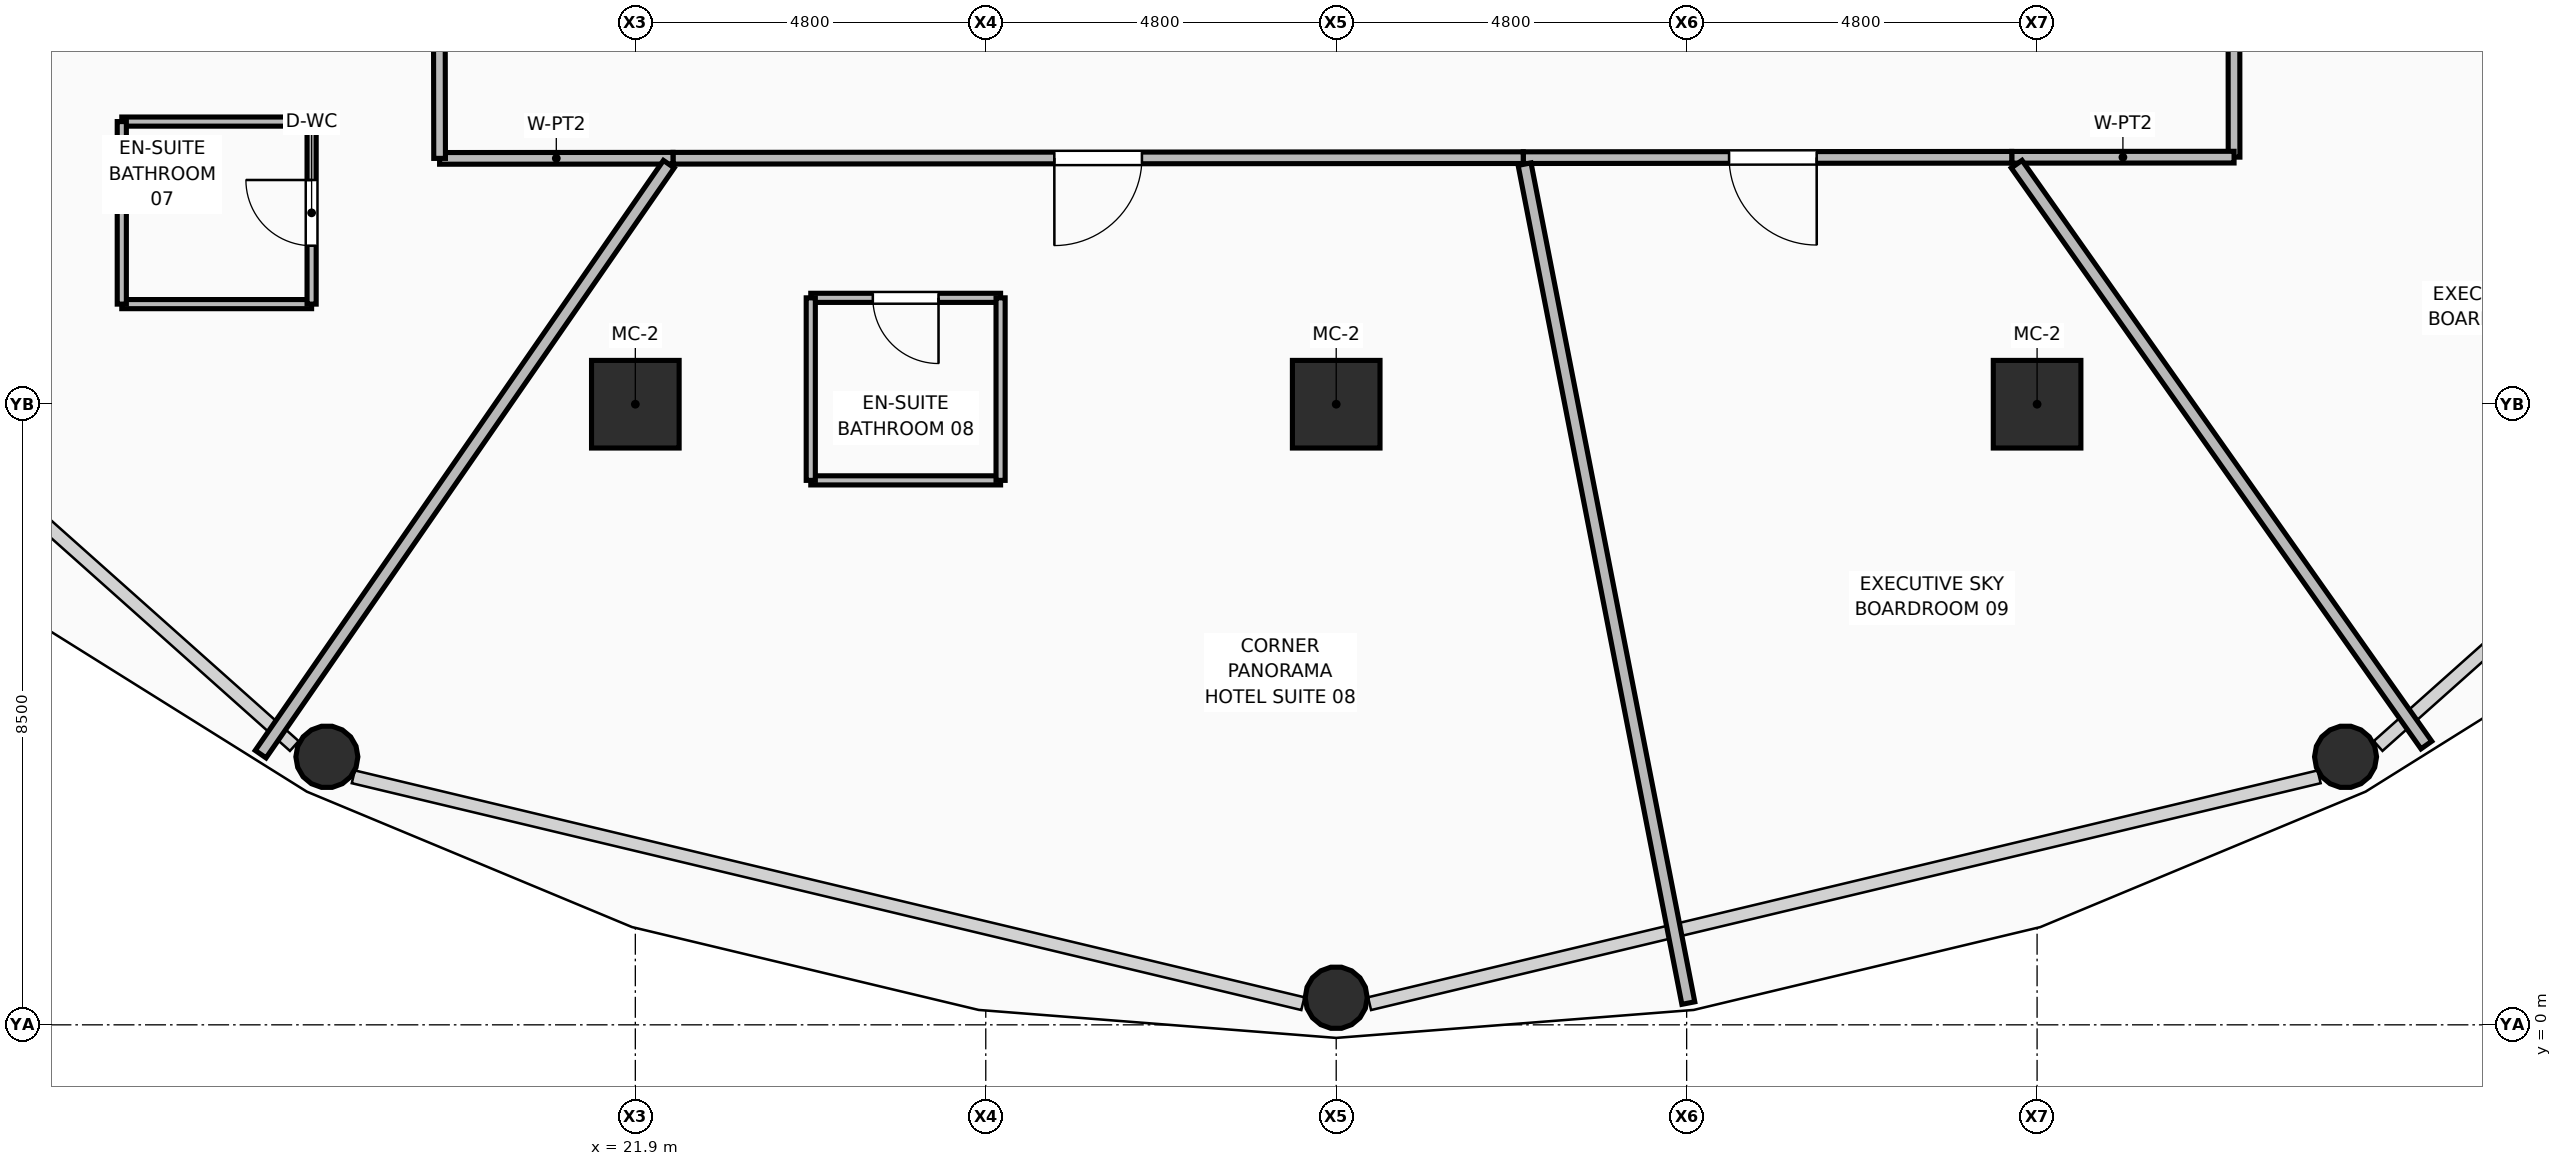
"""IFC4 building model, lengths in metres.
Left out: names, types, materials, properties, quantities, classifications, styles, units other than length and angle.
Written with IfcOpenShell. Run it as: python <this file> out.ifc"""

import sys

from ifc_helpers import new_model, si_unit, direction, frame, frame_2d, origin, origin_2d, place, context, subcontext, project, spatial, rectangle, hollow_rectangle, hollow_circle, extrude, element, fill, save


model = new_model("IFC4")
c1 = context("Model", 3, precision=1e-05, world=origin(), true_north=direction((0.0, 1.0)))
c2 = subcontext(c1, "Body", "Model", "MODEL_VIEW")
j1 = project(units=[si_unit("LENGTHUNIT", "METRE"), si_unit("PLANEANGLEUNIT", "RADIAN")], contexts=[c1])
p1 = place(None, origin())
s1 = spatial("IfcSite", under=j1, at=p1, CompositionType="ELEMENT")
p2 = place(p1, origin())
s2 = spatial("IfcBuilding", under=s1, at=p2, CompositionType="ELEMENT")
p3 = place(p2, frame((0.0, 0.0, 75.75)))
s3 = spatial("IfcBuildingStorey", under=s2, at=p3, CompositionType="ELEMENT", Elevation=75.75)
for number, where, z_axis, x_axis in (
    (1, (21.9, 8.5, 0.0), (0.0, 0.0, 1.0), (1.0, 0.0, 0.0)),
    (2, (31.5, 8.5, 0.0), (0.0, 0.0, 1.0), (1.0, 0.0, 0.0)),
    (3, (41.1, 8.5, 0.0), (0.0, 0.0, 1.0), (1.0, 0.0, 0.0)),
):
    element("IfcColumn", number, at=place(p3, frame(where, z_axis=z_axis, x_axis=x_axis)), inside=s3, PredefinedType="COLUMN", context=c2, shape_type="SweptSolid", body=[
        extrude(hollow_rectangle(XDim=1.2, YDim=1.2, WallThickness=0.045, at=origin_2d()), origin(), (0.0, 0.0, 1.0), 3.75),
    ])
p4 = place(p3, frame((17.675, 3.671, 0.0), z_axis=(0.020978592197, 0.032527068032, 0.999250663505), x_axis=(-0.840374471714, 0.542006224404, 0.0)))
e4 = element("IfcColumn", 4, at=p4, inside=s3, PredefinedType="COLUMN", context=c2, shape_type="SweptSolid", body=[
    extrude(hollow_circle(Radius=0.425, WallThickness=0.04, at=origin_2d()), origin(), (0.0, 0.0, 1.0), 3.573),
])
p5 = place(p3, frame((31.5, 0.371, 0.0), z_axis=(0.0, 0.037448923039, 0.999298543061), x_axis=(-1.0, 0.0, 0.0)))
e5 = element("IfcColumn", 5, at=p5, inside=s3, PredefinedType="COLUMN", context=c2, shape_type="SweptSolid", body=[
    extrude(hollow_circle(Radius=0.425, WallThickness=0.04, at=origin_2d()), origin(), (0.0, 0.0, 1.0), 3.573),
])
p6 = place(p3, frame((45.325, 3.671, 0.0), z_axis=(-0.020978592197, 0.032527068032, 0.999250663505), x_axis=(-0.840374471714, -0.542006224404, 0.0)))
e6 = element("IfcColumn", 6, at=p6, inside=s3, PredefinedType="COLUMN", context=c2, shape_type="SweptSolid", body=[
    extrude(hollow_circle(Radius=0.425, WallThickness=0.04, at=origin_2d()), origin(), (0.0, 0.0, 1.0), 3.573),
])
p7 = place(p3, frame((43.794, 17.225, 0.0), z_axis=(0.0, 0.0, 1.0), x_axis=(0.000777071576, -0.99999969808, 0.0)))
e7 = element("IfcWall", 7, at=p7, inside=s3, PredefinedType="PARTITIONING", context=c2, shape_type="SweptSolid", body=[
    extrude(rectangle(XDim=5.341, YDim=0.16, at=frame_2d((2.67, 0.0))), origin(), (0.0, 0.0, 1.0), 2.928),
])
p8 = place(p7, frame((0.601, 0.0, 0.0)))
e8 = element("IfcOpeningElement", 8, at=p8, cuts=e7, PredefinedType="OPENING", context=c2, shape_type="SweptSolid", body=[
    extrude(rectangle(XDim=1.2, YDim=2.1, at=frame_2d((0.6, 1.05))), frame((0.0, 0.09, 0.0), z_axis=(0.0, -1.0, 0.0), x_axis=(1.0, 0.0, 0.0)), (0.0, 0.0, 1.0), 0.18),
])
p9 = place(p3, frame((43.798, 11.884, 0.0), z_axis=(0.0, 0.0, 1.0), x_axis=(-0.999999794312, -0.000641385261, 0.0)))
e9 = element("IfcWall", 9, at=p9, inside=s3, PredefinedType="PARTITIONING", context=c2, shape_type="SweptSolid", body=[
    extrude(rectangle(XDim=3.045, YDim=0.16, at=frame_2d((1.522, 0.0))), origin(), (0.0, 0.0, 1.0), 2.928),
])
p10 = place(p3, frame((40.753, 11.882, 0.0), z_axis=(0.0, 0.0, 1.0), x_axis=(-0.999999706426, -0.00076625534, 0.0)))
e10 = element("IfcWall", 10, at=p10, inside=s3, PredefinedType="PARTITIONING", context=c2, shape_type="SweptSolid", body=[
    extrude(rectangle(XDim=6.691, YDim=0.16, at=frame_2d((3.345, 0.0))), origin(), (0.0, 0.0, 1.0), 3.55),
])
p11 = place(p10, frame((2.672, 0.0, 0.0)))
e11 = element("IfcOpeningElement", 11, at=p11, cuts=e10, PredefinedType="OPENING", context=c2, shape_type="SweptSolid", body=[
    extrude(rectangle(XDim=1.2, YDim=2.1, at=frame_2d((0.6, 1.05))), frame((0.0, 0.09, 0.0), z_axis=(0.0, -1.0, 0.0), x_axis=(1.0, 0.0, 0.0)), (0.0, 0.0, 1.0), 0.18),
])
p12 = place(p3, frame((34.062, 11.877, 0.0), z_axis=(0.0, 0.0, 1.0), x_axis=(-0.99999976071, -0.000691794728, 0.0)))
e12 = element("IfcWall", 12, at=p12, inside=s3, PredefinedType="PARTITIONING", context=c2, shape_type="SweptSolid", body=[
    extrude(rectangle(XDim=11.646, YDim=0.16, at=frame_2d((5.823, 0.0))), origin(), (0.0, 0.0, 1.0), 2.928),
])
p13 = place(p12, frame((5.223, 0.0, 0.0)))
e13 = element("IfcOpeningElement", 13, at=p13, cuts=e12, PredefinedType="OPENING", context=c2, shape_type="SweptSolid", body=[
    extrude(rectangle(XDim=1.2, YDim=2.1, at=frame_2d((0.6, 1.05))), frame((0.0, 0.09, 0.0), z_axis=(0.0, -1.0, 0.0), x_axis=(1.0, 0.0, 0.0)), (0.0, 0.0, 1.0), 0.18),
])
p14 = place(p3, frame((22.416, 11.869, 0.0), z_axis=(0.0, 0.0, 1.0), x_axis=(-0.999999813388, -0.000610920085, 0.0)))
e14 = element("IfcWall", 14, at=p14, inside=s3, PredefinedType="PARTITIONING", context=c2, shape_type="SweptSolid", body=[
    extrude(rectangle(XDim=3.197, YDim=0.16, at=frame_2d((1.599, 0.0))), origin(), (0.0, 0.0, 1.0), 2.928),
])
p15 = place(p3, frame((19.219, 11.867, 0.0), z_axis=(0.0, 0.0, 1.0), x_axis=(-0.001717915349, 0.999998524382, 0.0)))
e15 = element("IfcWall", 15, at=p15, inside=s3, PredefinedType="PARTITIONING", context=c2, shape_type="SweptSolid", body=[
    extrude(rectangle(XDim=9.948, YDim=0.16, at=frame_2d((4.974, 0.0))), origin(), (0.0, 0.0, 1.0), 2.928),
])
p16 = place(p15, frame((8.144, 0.0, 0.0)))
e16 = element("IfcOpeningElement", 16, at=p16, cuts=e15, PredefinedType="OPENING", context=c2, shape_type="SweptSolid", body=[
    extrude(rectangle(XDim=1.2, YDim=2.1, at=frame_2d((0.6, 1.05))), frame((0.0, 0.09, 0.0), z_axis=(0.0, -1.0, 0.0), x_axis=(1.0, 0.0, 0.0)), (0.0, 0.0, 1.0), 0.18),
])
p17 = place(p3, frame((22.359, 11.788, 0.0), z_axis=(0.0, 0.0, 1.0), x_axis=(-0.568951562239, -0.822371035376, 0.0)))
e17 = element("IfcWall", 17, at=p17, inside=s3, PredefinedType="PARTITIONING", context=c2, shape_type="SweptSolid", body=[
    extrude(rectangle(XDim=9.826, YDim=0.18, at=frame_2d((4.913, 0.0))), origin(), (0.0, 0.0, 1.0), 2.775),
])
p18 = place(p3, frame((34.08, 11.788, 0.0), z_axis=(0.0, 0.0, 1.0), x_axis=(0.191590227311, -0.981475004674, 0.0)))
e18 = element("IfcWall", 18, at=p18, inside=s3, PredefinedType="PARTITIONING", context=c2, shape_type="SweptSolid", body=[
    extrude(rectangle(XDim=11.707, YDim=0.18, at=frame_2d((5.854, 0.0))), origin(), (0.0, 0.0, 1.0), 2.775),
])
p19 = place(p3, frame((40.82, 11.788, 0.0), z_axis=(0.0, 0.0, 1.0), x_axis=(0.576393717645, -0.817172125234, 0.0)))
e19 = element("IfcWall", 19, at=p19, inside=s3, PredefinedType="PARTITIONING", context=c2, shape_type="SweptSolid", body=[
    extrude(rectangle(XDim=9.736, YDim=0.18, at=frame_2d((4.868, 0.0))), origin(), (0.0, 0.0, 1.0), 2.775),
])
p20 = place(p3, frame((43.878, 17.172, 0.0), z_axis=(0.0, 0.0, 1.0), x_axis=(0.845177570146, -0.534485617132, 0.0)))
e20 = element("IfcWall", 20, at=p20, inside=s3, PredefinedType="PARTITIONING", context=c2, shape_type="SweptSolid", body=[
    extrude(rectangle(XDim=12.379, YDim=0.18, at=frame_2d((6.189, 0.0))), origin(), (0.0, 0.0, 1.0), 2.775),
])
for number, where, z_axis, x_axis in (
    (21, (14.866, 9.871, 0.0), (0.0, 0.0, 1.0), (1.0, 0.0, 0.0)),
    (22, (14.866, 12.371, 0.0), (0.0, 0.0, 1.0), (1.0, 0.0, 0.0)),
):
    element("IfcWall", number, at=place(p3, frame(where, z_axis=z_axis, x_axis=x_axis)), inside=s3, PredefinedType="PARTITIONING", context=c2, shape_type="SweptSolid", body=[
        extrude(rectangle(XDim=2.6, YDim=0.125, at=frame_2d((1.3, 0.0))), origin(), (0.0, 0.0, 1.0), 3.55),
    ])
p21 = place(p3, frame((14.866, 9.871, 0.0), z_axis=(0.0, 0.0, 1.0), x_axis=(0.0, 1.0, 0.0)))
e23 = element("IfcWall", 23, at=p21, inside=s3, PredefinedType="PARTITIONING", context=c2, shape_type="SweptSolid", body=[
    extrude(rectangle(XDim=2.5, YDim=0.125, at=frame_2d((1.25, 0.0))), origin(), (0.0, 0.0, 1.0), 3.55),
])
p22 = place(p3, frame((17.466, 9.871, 0.0), z_axis=(0.0, 0.0, 1.0), x_axis=(0.0, 1.0, 0.0)))
e24 = element("IfcWall", 24, at=p22, inside=s3, PredefinedType="PARTITIONING", context=c2, shape_type="SweptSolid", body=[
    extrude(rectangle(XDim=2.5, YDim=0.125, at=frame_2d((1.25, 0.0))), origin(), (0.0, 0.0, 1.0), 3.55),
])
p23 = place(p22, frame((0.8, 0.0, 0.0)))
e25 = element("IfcOpeningElement", 25, at=p23, cuts=e24, PredefinedType="OPENING", context=c2, shape_type="SweptSolid", body=[
    extrude(rectangle(XDim=0.9, YDim=2.1, at=frame_2d((0.45, 1.05))), frame((0.0, 0.073, 0.0), z_axis=(0.0, -1.0, 0.0), x_axis=(1.0, 0.0, 0.0)), (0.0, 0.0, 1.0), 0.145),
])
p24 = place(p3, frame((24.303, 7.457, 0.0), z_axis=(0.0, 0.0, 1.0), x_axis=(1.0, 0.0, 0.0)))
e26 = element("IfcWall", 26, at=p24, inside=s3, PredefinedType="PARTITIONING", context=c2, shape_type="SweptSolid", body=[
    extrude(rectangle(XDim=2.6, YDim=0.125, at=frame_2d((1.3, 0.0))), origin(), (0.0, 0.0, 1.0), 3.55),
])
p25 = place(p3, frame((24.303, 9.957, 0.0), z_axis=(0.0, 0.0, 1.0), x_axis=(1.0, 0.0, 0.0)))
e27 = element("IfcWall", 27, at=p25, inside=s3, PredefinedType="PARTITIONING", context=c2, shape_type="SweptSolid", body=[
    extrude(rectangle(XDim=2.6, YDim=0.125, at=frame_2d((1.3, 0.0))), origin(), (0.0, 0.0, 1.0), 3.55),
])
p26 = place(p25, frame((0.85, 0.0, 0.0)))
e28 = element("IfcOpeningElement", 28, at=p26, cuts=e27, PredefinedType="OPENING", context=c2, shape_type="SweptSolid", body=[
    extrude(rectangle(XDim=0.9, YDim=2.1, at=frame_2d((0.45, 1.05))), frame((0.0, 0.073, 0.0), z_axis=(0.0, -1.0, 0.0), x_axis=(1.0, 0.0, 0.0)), (0.0, 0.0, 1.0), 0.145),
])
for number, where, z_axis, x_axis in (
    (29, (24.303, 7.457, 0.0), (0.0, 0.0, 1.0), (0.0, 1.0, 0.0)),
    (30, (26.903, 7.457, 0.0), (0.0, 0.0, 1.0), (0.0, 1.0, 0.0)),
):
    element("IfcWall", number, at=place(p3, frame(where, z_axis=z_axis, x_axis=x_axis)), inside=s3, PredefinedType="PARTITIONING", context=c2, shape_type="SweptSolid", body=[
        extrude(rectangle(XDim=2.5, YDim=0.125, at=frame_2d((1.25, 0.0))), origin(), (0.0, 0.0, 1.0), 3.55),
    ])
p27 = place(p23, origin())
e31 = element("IfcDoor", 31, at=p27, inside=s3, OperationType="SINGLE_SWING_RIGHT", PredefinedType="DOOR", context=c2, shape_type="SweptSolid", body=[
    extrude(rectangle(XDim=0.9, YDim=2.1, at=frame_2d((0.45, 1.05))), frame((0.0, 0.025, 0.0), z_axis=(0.0, -1.0, 0.0), x_axis=(1.0, 0.0, 0.0)), (0.0, 0.0, 1.0), 0.05),
])
fill(e25, e31)
p28 = place(p26, frame((0.9, 0.0, 0.0), z_axis=(0.0, 0.0, 1.0), x_axis=(-1.0, 0.0, 0.0)))
e32 = element("IfcDoor", 32, at=p28, inside=s3, OperationType="SINGLE_SWING_LEFT", PredefinedType="DOOR", context=c2, shape_type="SweptSolid", body=[
    extrude(rectangle(XDim=0.9, YDim=2.1, at=frame_2d((0.45, 1.05))), frame((0.0, 0.025, 0.0), z_axis=(0.0, -1.0, 0.0), x_axis=(1.0, 0.0, 0.0)), (0.0, 0.0, 1.0), 0.05),
])
fill(e28, e32)
p29 = place(p13, origin())
e33 = element("IfcDoor", 33, at=p29, inside=s3, OperationType="SINGLE_SWING_RIGHT", PredefinedType="DOOR", context=c2, shape_type="SweptSolid", body=[
    extrude(rectangle(XDim=1.2, YDim=2.1, at=frame_2d((0.6, 1.05))), frame((0.0, 0.025, 0.0), z_axis=(0.0, -1.0, 0.0), x_axis=(1.0, 0.0, 0.0)), (0.0, 0.0, 1.0), 0.05),
])
fill(e13, e33)
p30 = place(p11, origin())
e34 = element("IfcDoor", 34, at=p30, inside=s3, OperationType="SINGLE_SWING_LEFT", PredefinedType="DOOR", context=c2, shape_type="SweptSolid", body=[
    extrude(rectangle(XDim=1.2, YDim=2.1, at=frame_2d((0.6, 1.05))), frame((0.0, 0.025, 0.0), z_axis=(0.0, -1.0, 0.0), x_axis=(1.0, 0.0, 0.0)), (0.0, 0.0, 1.0), 0.05),
])
fill(e11, e34)
save(model, sys.argv[1])
